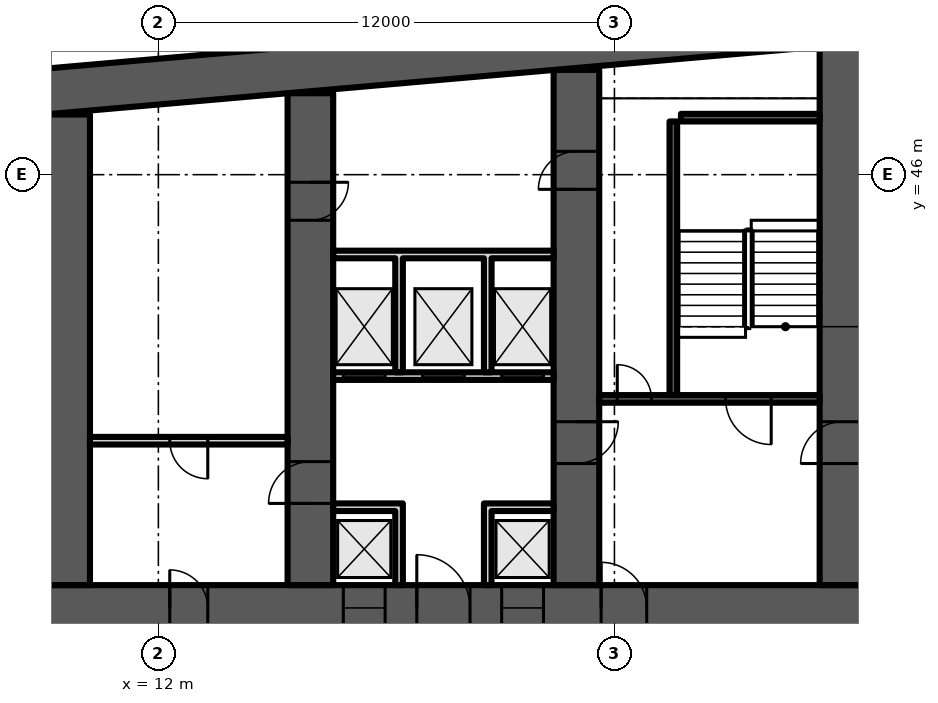
"""IFC4 building model, lengths in metres.
Left out: names, types, materials, properties, quantities, classifications, styles, units other than length and angle.
Written with IfcOpenShell. Run it as: python <this file> out.ifc"""

import sys

from ifc_helpers import new_model, si_unit, direction, frame, frame_2d, origin, place, context, subcontext, project, spatial, polyline, rectangle, outline, extrude, element, fill, save


model = new_model("IFC4")
c1 = context("Model", 3, precision=1e-05, world=origin(), true_north=direction((0.0, 1.0)))
c2 = subcontext(c1, "Body", "Model", "MODEL_VIEW")
j1 = project(units=[si_unit("LENGTHUNIT", "METRE"), si_unit("PLANEANGLEUNIT", "RADIAN")], contexts=[c1])
p1 = place(None, origin())
s1 = spatial("IfcSite", under=j1, at=p1, CompositionType="ELEMENT")
p2 = place(p1, origin())
s2 = spatial("IfcBuilding", under=s1, at=p2, CompositionType="ELEMENT")
p3 = place(p2, frame((0.0, 0.0, 84.7)))
s3 = spatial("IfcBuildingStorey", under=s2, at=p3, CompositionType="ELEMENT", Elevation=84.7)
p4 = place(p3, origin())
e1 = element("IfcWall", 1, at=p4, inside=s3, PredefinedType="SHEAR", context=c2, shape_type="SweptSolid", body=[
    extrude(outline(polyline([(9.0, 47.583), (37.0, 50.032), (65.0, 47.583), (65.0, 48.787), (37.0, 51.237), (9.0, 48.787), (9.0, 47.583)])), origin(), (0.0, 0.0, 1.0), 3.6),
])
p5 = place(p3, frame((9.0, 34.6, 0.0), z_axis=(0.0, 0.0, 1.0), x_axis=(1.0, 0.0, 0.0)))
e2 = element("IfcWall", 2, at=p5, inside=s3, PredefinedType="SHEAR", context=c2, shape_type="SweptSolid", body=[
    extrude(rectangle(XDim=56.0, YDim=1.2, at=frame_2d((28.0, 0.0))), origin(), (0.0, 0.0, 1.0), 3.6),
])
p6 = place(p5, frame((3.3, 0.0, 0.0)))
e3 = element("IfcOpeningElement", 3, at=p6, cuts=e2, PredefinedType="OPENING", context=c2, shape_type="SweptSolid", body=[
    extrude(rectangle(XDim=1.0, YDim=2.1, at=frame_2d((0.5, 1.05))), frame((0.0, 0.61, 0.0), z_axis=(0.0, -1.0, 0.0), x_axis=(1.0, 0.0, 0.0)), (0.0, 0.0, 1.0), 1.22),
])
p7 = place(p5, frame((7.867, 0.0, 0.0)))
e4 = element("IfcOpeningElement", 4, at=p7, cuts=e2, PredefinedType="OPENING", context=c2, shape_type="SweptSolid", body=[
    extrude(rectangle(XDim=1.1, YDim=2.1, at=frame_2d((0.55, 1.05))), frame((0.0, 0.61, 0.0), z_axis=(0.0, -1.0, 0.0), x_axis=(1.0, 0.0, 0.0)), (0.0, 0.0, 1.0), 1.22),
])
p8 = place(p5, frame((12.033, 0.0, 0.0)))
e5 = element("IfcOpeningElement", 5, at=p8, cuts=e2, PredefinedType="OPENING", context=c2, shape_type="SweptSolid", body=[
    extrude(rectangle(XDim=1.1, YDim=2.1, at=frame_2d((0.55, 1.05))), frame((0.0, 0.61, 0.0), z_axis=(0.0, -1.0, 0.0), x_axis=(1.0, 0.0, 0.0)), (0.0, 0.0, 1.0), 1.22),
])
p9 = place(p5, frame((9.8, 0.0, 0.0)))
e6 = element("IfcOpeningElement", 6, at=p9, cuts=e2, PredefinedType="OPENING", context=c2, shape_type="SweptSolid", body=[
    extrude(rectangle(XDim=1.4, YDim=2.1, at=frame_2d((0.7, 1.05))), frame((0.0, 0.61, 0.0), z_axis=(0.0, -1.0, 0.0), x_axis=(1.0, 0.0, 0.0)), (0.0, 0.0, 1.0), 1.22),
])
p10 = place(p5, frame((14.65, 0.0, 0.0)))
e7 = element("IfcOpeningElement", 7, at=p10, cuts=e2, PredefinedType="OPENING", context=c2, shape_type="SweptSolid", body=[
    extrude(rectangle(XDim=1.2, YDim=2.1, at=frame_2d((0.6, 1.05))), frame((0.0, 0.61, 0.0), z_axis=(0.0, -1.0, 0.0), x_axis=(1.0, 0.0, 0.0)), (0.0, 0.0, 1.0), 1.22),
])
p11 = place(p5, frame((21.867, 0.0, 0.0)))
e8 = element("IfcOpeningElement", 8, at=p11, cuts=e2, PredefinedType="OPENING", context=c2, shape_type="SweptSolid", body=[
    extrude(rectangle(XDim=1.1, YDim=2.1, at=frame_2d((0.55, 1.05))), frame((0.0, 0.61, 0.0), z_axis=(0.0, -1.0, 0.0), x_axis=(1.0, 0.0, 0.0)), (0.0, 0.0, 1.0), 1.22),
])
p12 = place(p5, frame((26.033, 0.0, 0.0)))
e9 = element("IfcOpeningElement", 9, at=p12, cuts=e2, PredefinedType="OPENING", context=c2, shape_type="SweptSolid", body=[
    extrude(rectangle(XDim=1.1, YDim=2.1, at=frame_2d((0.55, 1.05))), frame((0.0, 0.61, 0.0), z_axis=(0.0, -1.0, 0.0), x_axis=(1.0, 0.0, 0.0)), (0.0, 0.0, 1.0), 1.22),
])
p13 = place(p5, frame((23.8, 0.0, 0.0)))
e10 = element("IfcOpeningElement", 10, at=p13, cuts=e2, PredefinedType="OPENING", context=c2, shape_type="SweptSolid", body=[
    extrude(rectangle(XDim=1.4, YDim=2.1, at=frame_2d((0.7, 1.05))), frame((0.0, 0.61, 0.0), z_axis=(0.0, -1.0, 0.0), x_axis=(1.0, 0.0, 0.0)), (0.0, 0.0, 1.0), 1.22),
])
p14 = place(p5, frame((28.867, 0.0, 0.0)))
e11 = element("IfcOpeningElement", 11, at=p14, cuts=e2, PredefinedType="OPENING", context=c2, shape_type="SweptSolid", body=[
    extrude(rectangle(XDim=1.1, YDim=2.1, at=frame_2d((0.55, 1.05))), frame((0.0, 0.61, 0.0), z_axis=(0.0, -1.0, 0.0), x_axis=(1.0, 0.0, 0.0)), (0.0, 0.0, 1.0), 1.22),
])
p15 = place(p5, frame((33.033, 0.0, 0.0)))
e12 = element("IfcOpeningElement", 12, at=p15, cuts=e2, PredefinedType="OPENING", context=c2, shape_type="SweptSolid", body=[
    extrude(rectangle(XDim=1.1, YDim=2.1, at=frame_2d((0.55, 1.05))), frame((0.0, 0.61, 0.0), z_axis=(0.0, -1.0, 0.0), x_axis=(1.0, 0.0, 0.0)), (0.0, 0.0, 1.0), 1.22),
])
p16 = place(p5, frame((40.15, 0.0, 0.0)))
e13 = element("IfcOpeningElement", 13, at=p16, cuts=e2, PredefinedType="OPENING", context=c2, shape_type="SweptSolid", body=[
    extrude(rectangle(XDim=1.2, YDim=2.1, at=frame_2d((0.6, 1.05))), frame((0.0, 0.61, 0.0), z_axis=(0.0, -1.0, 0.0), x_axis=(1.0, 0.0, 0.0)), (0.0, 0.0, 1.0), 1.22),
])
p17 = place(p5, frame((44.8, 0.0, 0.0)))
e14 = element("IfcOpeningElement", 14, at=p17, cuts=e2, PredefinedType="OPENING", context=c2, shape_type="SweptSolid", body=[
    extrude(rectangle(XDim=1.4, YDim=2.1, at=frame_2d((0.7, 1.05))), frame((0.0, 0.61, 0.0), z_axis=(0.0, -1.0, 0.0), x_axis=(1.0, 0.0, 0.0)), (0.0, 0.0, 1.0), 1.22),
])
p18 = place(p5, frame((49.867, 0.0, 0.0)))
e15 = element("IfcOpeningElement", 15, at=p18, cuts=e2, PredefinedType="OPENING", context=c2, shape_type="SweptSolid", body=[
    extrude(rectangle(XDim=1.1, YDim=2.1, at=frame_2d((0.55, 1.05))), frame((0.0, 0.61, 0.0), z_axis=(0.0, -1.0, 0.0), x_axis=(1.0, 0.0, 0.0)), (0.0, 0.0, 1.0), 1.22),
])
p19 = place(p5, frame((53.5, 0.0, 0.0)))
e16 = element("IfcOpeningElement", 16, at=p19, cuts=e2, PredefinedType="OPENING", context=c2, shape_type="SweptSolid", body=[
    extrude(rectangle(XDim=1.1, YDim=2.1, at=frame_2d((0.55, 1.05))), frame((0.0, 0.61, 0.0), z_axis=(0.0, -1.0, 0.0), x_axis=(1.0, 0.0, 0.0)), (0.0, 0.0, 1.0), 1.22),
])
p20 = place(p5, frame((51.567, 0.0, 0.0)))
e17 = element("IfcOpeningElement", 17, at=p20, cuts=e2, PredefinedType="OPENING", context=c2, shape_type="SweptSolid", body=[
    extrude(rectangle(XDim=1.4, YDim=2.1, at=frame_2d((0.7, 1.05))), frame((0.0, 0.61, 0.0), z_axis=(0.0, -1.0, 0.0), x_axis=(1.0, 0.0, 0.0)), (0.0, 0.0, 1.0), 1.22),
])
p21 = place(p3, frame((9.6, 35.2, 0.0), z_axis=(0.0, 0.0, 1.0), x_axis=(0.0, 1.0, 0.0)))
e18 = element("IfcWall", 18, at=p21, inside=s3, PredefinedType="SHEAR", context=c2, shape_type="SweptSolid", body=[
    extrude(rectangle(XDim=12.383, YDim=1.2, at=frame_2d((6.191, 0.0))), origin(), (0.0, 0.0, 1.0), 3.6),
])
p22 = place(p3, frame((16.0, 35.2, 0.0), z_axis=(0.0, 0.0, 1.0), x_axis=(0.0, 1.0, 0.0)))
e19 = element("IfcWall", 19, at=p22, inside=s3, PredefinedType="SHEAR", context=c2, shape_type="SweptSolid", body=[
    extrude(rectangle(XDim=12.943, YDim=1.2, at=frame_2d((6.471, 0.0))), origin(), (0.0, 0.0, 1.0), 3.6),
])
p23 = place(p22, frame((2.15, 0.0, 0.0)))
e20 = element("IfcOpeningElement", 20, at=p23, cuts=e19, PredefinedType="OPENING", context=c2, shape_type="SweptSolid", body=[
    extrude(rectangle(XDim=1.1, YDim=2.1, at=frame_2d((0.55, 1.05))), frame((0.0, 0.61, 0.0), z_axis=(0.0, -1.0, 0.0), x_axis=(1.0, 0.0, 0.0)), (0.0, 0.0, 1.0), 1.22),
])
p24 = place(p22, frame((9.6, 0.0, 0.0)))
e21 = element("IfcOpeningElement", 21, at=p24, cuts=e19, PredefinedType="OPENING", context=c2, shape_type="SweptSolid", body=[
    extrude(rectangle(XDim=1.0, YDim=2.1, at=frame_2d((0.5, 1.05))), frame((0.0, 0.61, 0.0), z_axis=(0.0, -1.0, 0.0), x_axis=(1.0, 0.0, 0.0)), (0.0, 0.0, 1.0), 1.22),
])
p25 = place(p3, frame((23.0, 35.2, 0.0), z_axis=(0.0, 0.0, 1.0), x_axis=(0.0, 1.0, 0.0)))
e22 = element("IfcWall", 22, at=p25, inside=s3, PredefinedType="SHEAR", context=c2, shape_type="SweptSolid", body=[
    extrude(rectangle(XDim=13.555, YDim=1.2, at=frame_2d((6.778, 0.0))), origin(), (0.0, 0.0, 1.0), 3.6),
])
p26 = place(p25, frame((10.414, 0.0, 0.0)))
e23 = element("IfcOpeningElement", 23, at=p26, cuts=e22, PredefinedType="OPENING", context=c2, shape_type="SweptSolid", body=[
    extrude(rectangle(XDim=1.0, YDim=2.1, at=frame_2d((0.5, 1.05))), frame((0.0, 0.61, 0.0), z_axis=(0.0, -1.0, 0.0), x_axis=(1.0, 0.0, 0.0)), (0.0, 0.0, 1.0), 1.22),
])
p27 = place(p25, frame((3.2, 0.0, 0.0)))
e24 = element("IfcOpeningElement", 24, at=p27, cuts=e22, PredefinedType="OPENING", context=c2, shape_type="SweptSolid", body=[
    extrude(rectangle(XDim=1.1, YDim=2.1, at=frame_2d((0.55, 1.05))), frame((0.0, 0.61, 0.0), z_axis=(0.0, -1.0, 0.0), x_axis=(1.0, 0.0, 0.0)), (0.0, 0.0, 1.0), 1.22),
])
p28 = place(p3, frame((30.0, 35.2, 0.0), z_axis=(0.0, 0.0, 1.0), x_axis=(0.0, 1.0, 0.0)))
e25 = element("IfcWall", 25, at=p28, inside=s3, PredefinedType="SHEAR", context=c2, shape_type="SweptSolid", body=[
    extrude(rectangle(XDim=14.168, YDim=1.2, at=frame_2d((7.084, 0.0))), origin(), (0.0, 0.0, 1.0), 3.6),
])
p29 = place(p28, frame((3.2, 0.0, 0.0)))
e26 = element("IfcOpeningElement", 26, at=p29, cuts=e25, PredefinedType="OPENING", context=c2, shape_type="SweptSolid", body=[
    extrude(rectangle(XDim=1.1, YDim=2.1, at=frame_2d((0.55, 1.05))), frame((0.0, 0.61, 0.0), z_axis=(0.0, -1.0, 0.0), x_axis=(1.0, 0.0, 0.0)), (0.0, 0.0, 1.0), 1.22),
])
p30 = place(p3, frame((10.2, 39.0, 0.0), z_axis=(0.0, 0.0, 1.0), x_axis=(1.0, 0.0, 0.0)))
e27 = element("IfcWall", 27, at=p30, inside=s3, PredefinedType="PARTITIONING", context=c2, shape_type="SweptSolid", body=[
    extrude(rectangle(XDim=5.2, YDim=0.2, at=frame_2d((2.6, 0.0))), origin(), (0.0, 0.0, 1.0), 3.2),
])
p31 = place(p30, frame((2.1, 0.0, 0.0)))
e28 = element("IfcOpeningElement", 28, at=p31, cuts=e27, PredefinedType="OPENING", context=c2, shape_type="SweptSolid", body=[
    extrude(rectangle(XDim=1.0, YDim=2.1, at=frame_2d((0.5, 1.05))), frame((0.0, 0.11, 0.0), z_axis=(0.0, -1.0, 0.0), x_axis=(1.0, 0.0, 0.0)), (0.0, 0.0, 1.0), 0.22),
])
p32 = place(p3, frame((16.6, 40.7, 0.0), z_axis=(0.0, 0.0, 1.0), x_axis=(1.0, 0.0, 0.0)))
e29 = element("IfcWall", 29, at=p32, inside=s3, PredefinedType="PARTITIONING", context=c2, shape_type="SweptSolid", body=[
    extrude(rectangle(XDim=5.8, YDim=0.2, at=frame_2d((2.9, 0.0))), origin(), (0.0, 0.0, 1.0), 3.2),
])
p33 = place(p32, frame((0.267, 0.0, 0.0)))
e30 = element("IfcOpeningElement", 30, at=p33, cuts=e29, PredefinedType="OPENING", context=c2, shape_type="SweptSolid", body=[
    extrude(rectangle(XDim=1.1, YDim=2.1, at=frame_2d((0.55, 1.05))), frame((0.0, 0.11, 0.0), z_axis=(0.0, -1.0, 0.0), x_axis=(1.0, 0.0, 0.0)), (0.0, 0.0, 1.0), 0.22),
])
p34 = place(p32, frame((2.35, 0.0, 0.0)))
e31 = element("IfcOpeningElement", 31, at=p34, cuts=e29, PredefinedType="OPENING", context=c2, shape_type="SweptSolid", body=[
    extrude(rectangle(XDim=1.1, YDim=2.1, at=frame_2d((0.55, 1.05))), frame((0.0, 0.11, 0.0), z_axis=(0.0, -1.0, 0.0), x_axis=(1.0, 0.0, 0.0)), (0.0, 0.0, 1.0), 0.22),
])
p35 = place(p32, frame((4.433, 0.0, 0.0)))
e32 = element("IfcOpeningElement", 32, at=p35, cuts=e29, PredefinedType="OPENING", context=c2, shape_type="SweptSolid", body=[
    extrude(rectangle(XDim=1.1, YDim=2.1, at=frame_2d((0.55, 1.05))), frame((0.0, 0.11, 0.0), z_axis=(0.0, -1.0, 0.0), x_axis=(1.0, 0.0, 0.0)), (0.0, 0.0, 1.0), 0.22),
])
p36 = place(p3, frame((0.0, 0.0, -0.0)))
e33 = element("IfcWall", 33, at=p36, inside=s3, PredefinedType="PARTITIONING", context=c2, shape_type="SweptSolid", body=[
    extrude(outline(polyline([(18.233, 37.15), (16.6, 37.15), (16.6, 37.35), (18.233, 37.35), (18.433, 37.35), (18.433, 35.2), (18.233, 35.2), (18.233, 37.15)])), origin(), (0.0, 0.0, 1.0), 3.2),
])
p37 = place(p3, frame((0.0, 0.0, -0.0)))
e34 = element("IfcWall", 34, at=p37, inside=s3, PredefinedType="PARTITIONING", context=c2, shape_type="SweptSolid", body=[
    extrude(outline(polyline([(20.567, 37.35), (20.767, 37.35), (22.4, 37.35), (22.4, 37.15), (20.767, 37.15), (20.767, 35.2), (20.567, 35.2), (20.567, 37.35)])), origin(), (0.0, 0.0, 1.0), 3.2),
])
p38 = place(p3, frame((0.0, 0.0, -0.0)))
e35 = element("IfcWall", 35, at=p38, inside=s3, PredefinedType="PARTITIONING", context=c2, shape_type="SweptSolid", body=[
    extrude(outline(polyline([(18.433, 40.8), (18.233, 40.8), (18.233, 43.8), (16.6, 43.8), (16.6, 44.0), (22.4, 44.0), (22.4, 43.8), (20.767, 43.8), (20.767, 40.8), (20.567, 40.8), (20.567, 43.8), (18.433, 43.8), (18.433, 40.8)])), origin(), (0.0, 0.0, 1.0), 3.2),
])
p39 = place(p3, frame((23.6, 40.1, 0.0), z_axis=(0.0, 0.0, 1.0), x_axis=(1.0, 0.0, 0.0)))
e36 = element("IfcWall", 36, at=p39, inside=s3, PredefinedType="SHEAR", context=c2, shape_type="SweptSolid", body=[
    extrude(rectangle(XDim=5.8, YDim=0.2, at=frame_2d((2.9, 0.0))), origin(), (0.0, 0.0, 1.0), 3.2),
])
p40 = place(p39, frame((3.325, 0.0, 0.0)))
e37 = element("IfcOpeningElement", 37, at=p40, cuts=e36, PredefinedType="OPENING", context=c2, shape_type="SweptSolid", body=[
    extrude(rectangle(XDim=1.2, YDim=2.1, at=frame_2d((0.6, 1.05))), frame((0.0, 0.11, 0.0), z_axis=(0.0, -1.0, 0.0), x_axis=(1.0, 0.0, 0.0)), (0.0, 0.0, 1.0), 0.22),
])
p41 = place(p39, frame((0.475, 0.0, 0.0)))
e38 = element("IfcOpeningElement", 38, at=p41, cuts=e36, PredefinedType="OPENING", context=c2, shape_type="SweptSolid", body=[
    extrude(rectangle(XDim=0.9, YDim=2.1, at=frame_2d((0.45, 1.05))), frame((0.0, 0.11, 0.0), z_axis=(0.0, -1.0, 0.0), x_axis=(1.0, 0.0, 0.0)), (0.0, 0.0, 1.0), 0.22),
])
p42 = place(p3, frame((25.55, 40.2, 0.0), z_axis=(0.0, 0.0, 1.0), x_axis=(0.0, 1.0, 0.0)))
e39 = element("IfcWall", 39, at=p42, inside=s3, PredefinedType="SHEAR", context=c2, shape_type="SweptSolid", body=[
    extrude(rectangle(XDim=7.2, YDim=0.2, at=frame_2d((3.6, 0.0))), origin(), (0.0, 0.0, 1.0), 3.2),
])
p43 = place(p3, frame((25.75, 47.5, 0.0), z_axis=(0.0, 0.0, 1.0), x_axis=(1.0, 0.0, 0.0)))
e40 = element("IfcWall", 40, at=p43, inside=s3, PredefinedType="SHEAR", context=c2, shape_type="SweptSolid", body=[
    extrude(rectangle(XDim=3.65, YDim=0.2, at=frame_2d((1.825, 0.0))), origin(), (0.0, 0.0, 1.0), 3.2),
])
p44 = place(p6, origin())
e41 = element("IfcDoor", 41, at=p44, inside=s3, OperationType="SINGLE_SWING_LEFT", PredefinedType="DOOR", context=c2, shape_type="SweptSolid", body=[
    extrude(rectangle(XDim=1.0, YDim=2.1, at=frame_2d((0.5, 1.05))), frame((0.0, 0.6, 0.0), z_axis=(0.0, -1.0, 0.0), x_axis=(1.0, 0.0, 0.0)), (0.0, 0.0, 1.0), 1.199),
])
fill(e3, e41)
p45 = place(p31, origin())
e42 = element("IfcDoor", 42, at=p45, inside=s3, OperationType="SINGLE_SWING_RIGHT", PredefinedType="DOOR", context=c2, shape_type="SweptSolid", body=[
    extrude(rectangle(XDim=1.0, YDim=2.1, at=frame_2d((0.5, 1.05))), frame((0.0, 0.025, 0.0), z_axis=(0.0, -1.0, 0.0), x_axis=(1.0, 0.0, 0.0)), (0.0, 0.0, 1.0), 0.05),
])
fill(e28, e42)
p46 = place(p7, origin())
e43 = element("IfcDoor", 43, at=p46, inside=s3, OperationType="DOUBLE_DOOR_SLIDING", PredefinedType="DOOR", context=c2, shape_type="SweptSolid", body=[
    extrude(rectangle(XDim=1.1, YDim=2.1, at=frame_2d((0.55, 1.05))), frame((0.0, 0.025, 0.0), z_axis=(0.0, -1.0, 0.0), x_axis=(1.0, 0.0, 0.0)), (0.0, 0.0, 1.0), 0.05),
])
fill(e4, e43)
p47 = place(p8, origin())
e44 = element("IfcDoor", 44, at=p47, inside=s3, OperationType="DOUBLE_DOOR_SLIDING", PredefinedType="DOOR", context=c2, shape_type="SweptSolid", body=[
    extrude(rectangle(XDim=1.1, YDim=2.1, at=frame_2d((0.55, 1.05))), frame((0.0, 0.025, 0.0), z_axis=(0.0, -1.0, 0.0), x_axis=(1.0, 0.0, 0.0)), (0.0, 0.0, 1.0), 0.05),
])
fill(e5, e44)
p48 = place(p9, origin())
e45 = element("IfcDoor", 45, at=p48, inside=s3, OperationType="DOUBLE_DOOR_SINGLE_SWING", PredefinedType="DOOR", context=c2, shape_type="SweptSolid", body=[
    extrude(rectangle(XDim=1.4, YDim=2.1, at=frame_2d((0.7, 1.05))), frame((0.0, 0.025, 0.0), z_axis=(0.0, -1.0, 0.0), x_axis=(1.0, 0.0, 0.0)), (0.0, 0.0, 1.0), 0.05),
])
fill(e6, e45)
p49 = place(p33, origin())
e46 = element("IfcDoor", 46, at=p49, inside=s3, OperationType="DOUBLE_DOOR_SLIDING", PredefinedType="DOOR", context=c2, shape_type="SweptSolid", body=[
    extrude(rectangle(XDim=1.1, YDim=2.1, at=frame_2d((0.55, 1.05))), frame((0.0, 0.025, 0.0), z_axis=(0.0, -1.0, 0.0), x_axis=(1.0, 0.0, 0.0)), (0.0, 0.0, 1.0), 0.05),
])
fill(e30, e46)
p50 = place(p34, origin())
e47 = element("IfcDoor", 47, at=p50, inside=s3, OperationType="DOUBLE_DOOR_SLIDING", PredefinedType="DOOR", context=c2, shape_type="SweptSolid", body=[
    extrude(rectangle(XDim=1.1, YDim=2.1, at=frame_2d((0.55, 1.05))), frame((0.0, 0.025, 0.0), z_axis=(0.0, -1.0, 0.0), x_axis=(1.0, 0.0, 0.0)), (0.0, 0.0, 1.0), 0.05),
])
fill(e31, e47)
p51 = place(p35, origin())
e48 = element("IfcDoor", 48, at=p51, inside=s3, OperationType="DOUBLE_DOOR_SLIDING", PredefinedType="DOOR", context=c2, shape_type="SweptSolid", body=[
    extrude(rectangle(XDim=1.1, YDim=2.1, at=frame_2d((0.55, 1.05))), frame((0.0, 0.025, 0.0), z_axis=(0.0, -1.0, 0.0), x_axis=(1.0, 0.0, 0.0)), (0.0, 0.0, 1.0), 0.05),
])
fill(e32, e48)
p52 = place(p26, origin())
e49 = element("IfcDoor", 49, at=p52, inside=s3, OperationType="SINGLE_SWING_LEFT", PredefinedType="DOOR", context=c2, shape_type="SweptSolid", body=[
    extrude(rectangle(XDim=1.0, YDim=2.1, at=frame_2d((0.5, 1.05))), frame((0.0, 0.6, 0.0), z_axis=(0.0, -1.0, 0.0), x_axis=(1.0, 0.0, 0.0)), (0.0, 0.0, 1.0), 1.199),
])
fill(e23, e49)
p53 = place(p40, origin())
e50 = element("IfcDoor", 50, at=p53, inside=s3, OperationType="SINGLE_SWING_RIGHT", PredefinedType="DOOR", context=c2, shape_type="SweptSolid", body=[
    extrude(rectangle(XDim=1.2, YDim=2.1, at=frame_2d((0.6, 1.05))), frame((0.0, 0.025, 0.0), z_axis=(0.0, -1.0, 0.0), x_axis=(1.0, 0.0, 0.0)), (0.0, 0.0, 1.0), 0.05),
])
fill(e37, e50)
p54 = place(p41, origin())
e51 = element("IfcDoor", 51, at=p54, inside=s3, OperationType="SINGLE_SWING_LEFT", PredefinedType="DOOR", context=c2, shape_type="SweptSolid", body=[
    extrude(rectangle(XDim=0.9, YDim=2.1, at=frame_2d((0.45, 1.05))), frame((0.0, 0.025, 0.0), z_axis=(0.0, -1.0, 0.0), x_axis=(1.0, 0.0, 0.0)), (0.0, 0.0, 1.0), 0.05),
])
fill(e38, e51)
p55 = place(p10, origin())
e52 = element("IfcDoor", 52, at=p55, inside=s3, OperationType="SINGLE_SWING_LEFT", PredefinedType="DOOR", context=c2, shape_type="SweptSolid", body=[
    extrude(rectangle(XDim=1.2, YDim=2.1, at=frame_2d((0.6, 1.05))), frame((0.0, 0.025, 0.0), z_axis=(0.0, -1.0, 0.0), x_axis=(1.0, 0.0, 0.0)), (0.0, 0.0, 1.0), 0.05),
])
fill(e7, e52)
p56 = place(p23, origin())
e53 = element("IfcDoor", 53, at=p56, inside=s3, OperationType="SINGLE_SWING_LEFT", PredefinedType="DOOR", context=c2, shape_type="SweptSolid", body=[
    extrude(rectangle(XDim=1.1, YDim=2.1, at=frame_2d((0.55, 1.05))), frame((0.0, 0.025, 0.0), z_axis=(0.0, -1.0, 0.0), x_axis=(1.0, 0.0, 0.0)), (0.0, 0.0, 1.0), 0.05),
])
fill(e20, e53)
p57 = place(p24, origin())
e54 = element("IfcDoor", 54, at=p57, inside=s3, OperationType="SINGLE_SWING_RIGHT", PredefinedType="DOOR", context=c2, shape_type="SweptSolid", body=[
    extrude(rectangle(XDim=1.0, YDim=2.1, at=frame_2d((0.5, 1.05))), frame((0.0, 0.6, 0.0), z_axis=(0.0, -1.0, 0.0), x_axis=(1.0, 0.0, 0.0)), (0.0, 0.0, 1.0), 1.199),
])
fill(e21, e54)
p58 = place(p27, origin())
e55 = element("IfcDoor", 55, at=p58, inside=s3, OperationType="SINGLE_SWING_RIGHT", PredefinedType="DOOR", context=c2, shape_type="SweptSolid", body=[
    extrude(rectangle(XDim=1.1, YDim=2.1, at=frame_2d((0.55, 1.05))), frame((0.0, 0.025, 0.0), z_axis=(0.0, -1.0, 0.0), x_axis=(1.0, 0.0, 0.0)), (0.0, 0.0, 1.0), 0.05),
])
fill(e24, e55)
p59 = place(p29, origin())
e56 = element("IfcDoor", 56, at=p59, inside=s3, OperationType="SINGLE_SWING_LEFT", PredefinedType="DOOR", context=c2, shape_type="SweptSolid", body=[
    extrude(rectangle(XDim=1.1, YDim=2.1, at=frame_2d((0.55, 1.05))), frame((0.0, 0.025, 0.0), z_axis=(0.0, -1.0, 0.0), x_axis=(1.0, 0.0, 0.0)), (0.0, 0.0, 1.0), 0.05),
])
fill(e26, e56)
save(model, sys.argv[1])
